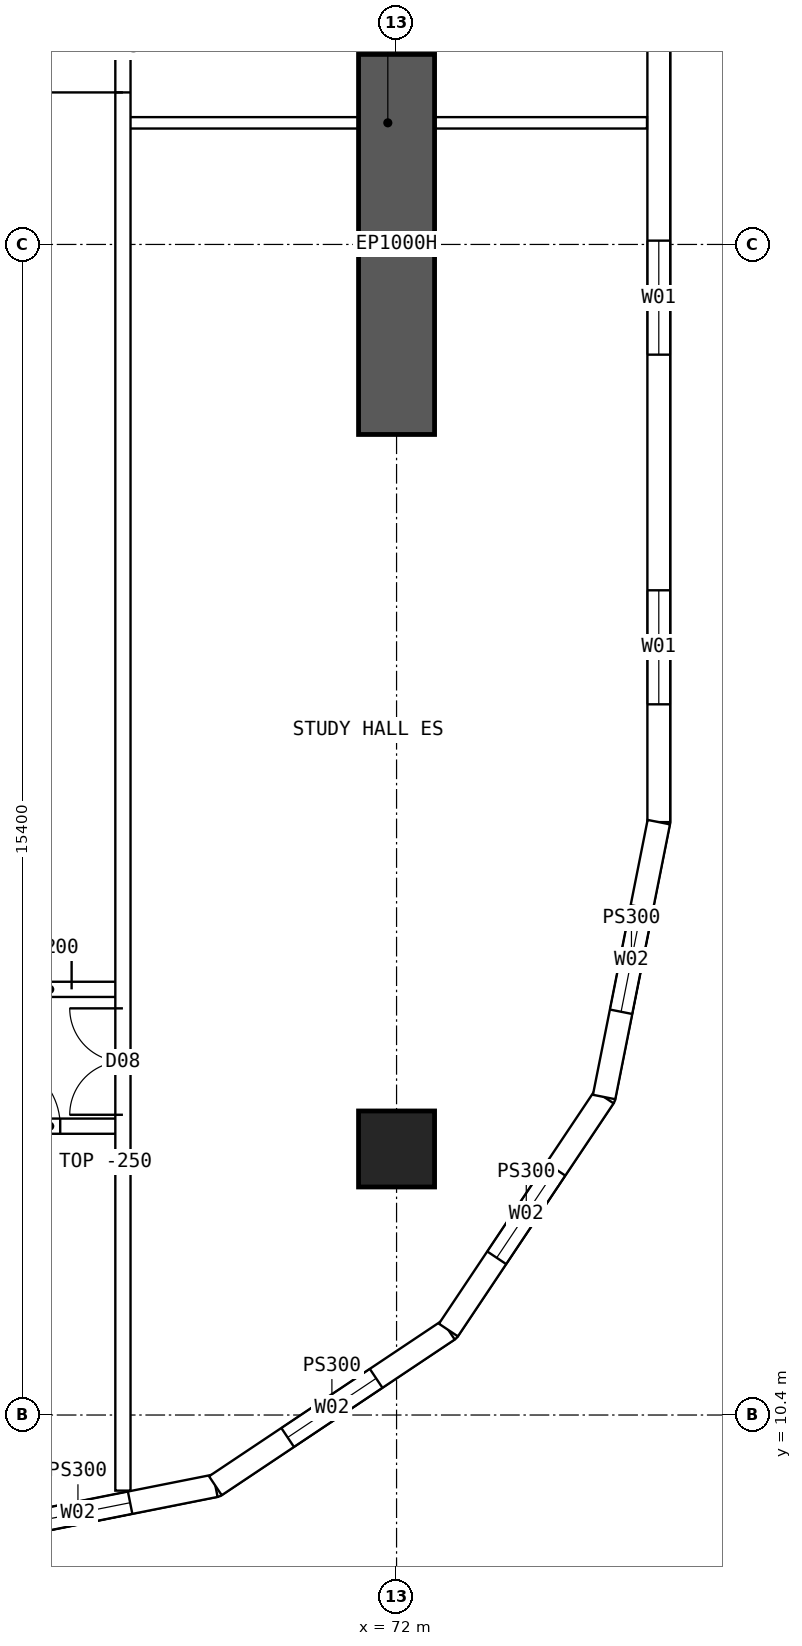
"""IFC4 building model, lengths in metres.
Left out: names, types, materials, properties, quantities, classifications, styles, units other than length and angle.
Written with IfcOpenShell. Run it as: python <this file> out.ifc"""

import sys

from ifc_helpers import new_model, si_unit, direction, frame, frame_2d, origin, origin_2d, place, context, subcontext, project, spatial, polyline, rectangle, hollow_rectangle, outline, extrude, element, fill, save


model = new_model("IFC4")
c1 = context("Model", 3, precision=1e-05, world=origin(), true_north=direction((0.0, 1.0)))
c2 = subcontext(c1, "Body", "Model", "MODEL_VIEW")
j1 = project(units=[si_unit("LENGTHUNIT", "METRE"), si_unit("PLANEANGLEUNIT", "RADIAN")], contexts=[c1])
p1 = place(None, origin())
s1 = spatial("IfcSite", under=j1, at=p1, CompositionType="ELEMENT")
p2 = place(p1, origin())
s2 = spatial("IfcBuilding", under=s1, at=p2, CompositionType="ELEMENT")
p3 = place(p2, frame((0.0, 0.0, 99.4)))
s3 = spatial("IfcBuildingStorey", under=s2, at=p3, CompositionType="ELEMENT", Elevation=99.4)
p4 = place(p3, frame((72.0, 13.9, 0.0), z_axis=(0.0, 0.0, 1.0), x_axis=(1.0, 0.0, 0.0)))
e1 = element("IfcColumn", 1, at=p4, inside=s3, PredefinedType="COLUMN", context=c2, shape_type="SweptSolid", body=[
    extrude(hollow_rectangle(XDim=1.0, YDim=1.0, WallThickness=0.1, at=origin_2d()), origin(), (0.0, 0.0, 1.0), 3.75),
])
p5 = place(p3, frame((72.0, 23.3, 0.0), z_axis=(0.0, 0.0, 1.0), x_axis=(0.0, 1.0, 0.0)))
e2 = element("IfcWall", 2, at=p5, inside=s3, PredefinedType="SHEAR", context=c2, shape_type="SweptSolid", body=[
    extrude(rectangle(XDim=5.0, YDim=1.0, at=frame_2d((2.5, 0.0))), origin(), (0.0, 0.0, 1.0), 3.75),
])
p6 = place(p3, frame((75.45, 18.2, 0.0), z_axis=(0.0, 0.0, 1.0), x_axis=(0.0, 1.0, 0.0)))
e3 = element("IfcWall", 3, at=p6, inside=s3, PredefinedType="SOLIDWALL", context=c2, shape_type="SweptSolid", body=[
    extrude(outline(polyline([(-0.015, -0.15), (27.615, -0.15), (27.585, 0.15), (0.015, 0.15), (-0.015, -0.15)])), origin(), (0.0, 0.0, 1.0), 3.5),
])
p7 = place(p6, frame((1.55, 0.0, 0.9)))
e4 = element("IfcOpeningElement", 4, at=p7, cuts=e3, PredefinedType="OPENING", context=c2, shape_type="SweptSolid", body=[
    extrude(rectangle(XDim=1.5, YDim=2.0, at=frame_2d((0.75, 1.0))), frame((0.0, 0.16, 0.0), z_axis=(0.0, -1.0, 0.0), x_axis=(1.0, 0.0, 0.0)), (0.0, 0.0, 1.0), 0.32),
])
p8 = place(p6, frame((6.15, 0.0, 0.9)))
e5 = element("IfcOpeningElement", 5, at=p8, cuts=e3, PredefinedType="OPENING", context=c2, shape_type="SweptSolid", body=[
    extrude(rectangle(XDim=1.5, YDim=2.0, at=frame_2d((0.75, 1.0))), frame((0.0, 0.16, 0.0), z_axis=(0.0, -1.0, 0.0), x_axis=(1.0, 0.0, 0.0)), (0.0, 0.0, 1.0), 0.32),
])
p9 = place(p6, frame((10.75, 0.0, 0.9)))
e6 = element("IfcOpeningElement", 6, at=p9, cuts=e3, PredefinedType="OPENING", context=c2, shape_type="SweptSolid", body=[
    extrude(rectangle(XDim=1.5, YDim=2.0, at=frame_2d((0.75, 1.0))), frame((0.0, 0.16, 0.0), z_axis=(0.0, -1.0, 0.0), x_axis=(1.0, 0.0, 0.0)), (0.0, 0.0, 1.0), 0.32),
])
p10 = place(p6, frame((15.35, 0.0, 0.9)))
e7 = element("IfcOpeningElement", 7, at=p10, cuts=e3, PredefinedType="OPENING", context=c2, shape_type="SweptSolid", body=[
    extrude(rectangle(XDim=1.5, YDim=2.0, at=frame_2d((0.75, 1.0))), frame((0.0, 0.16, 0.0), z_axis=(0.0, -1.0, 0.0), x_axis=(1.0, 0.0, 0.0)), (0.0, 0.0, 1.0), 0.32),
])
p11 = place(p6, frame((19.95, 0.0, 0.9)))
e8 = element("IfcOpeningElement", 8, at=p11, cuts=e3, PredefinedType="OPENING", context=c2, shape_type="SweptSolid", body=[
    extrude(rectangle(XDim=1.5, YDim=2.0, at=frame_2d((0.75, 1.0))), frame((0.0, 0.16, 0.0), z_axis=(0.0, -1.0, 0.0), x_axis=(1.0, 0.0, 0.0)), (0.0, 0.0, 1.0), 0.32),
])
p12 = place(p6, frame((24.55, 0.0, 0.9)))
e9 = element("IfcOpeningElement", 9, at=p12, cuts=e3, PredefinedType="OPENING", context=c2, shape_type="SweptSolid", body=[
    extrude(rectangle(XDim=1.5, YDim=2.0, at=frame_2d((0.75, 1.0))), frame((0.0, 0.16, 0.0), z_axis=(0.0, -1.0, 0.0), x_axis=(1.0, 0.0, 0.0)), (0.0, 0.0, 1.0), 0.32),
])
p13 = place(p3, frame((66.0, 8.75, 0.0), z_axis=(0.0, 0.0, 1.0), x_axis=(0.980791473772, 0.195059183267, 0.0)))
e10 = element("IfcWall", 10, at=p13, inside=s3, PredefinedType="SOLIDWALL", context=c2, shape_type="SweptSolid", body=[
    extrude(outline(polyline([(-0.03, -0.15), (3.717, -0.15), (3.657, 0.15), (0.03, 0.15), (-0.03, -0.15)])), origin(), (0.0, 0.0, 1.0), 3.5),
])
p14 = place(p13, frame((1.144, 0.0, 0.9)))
e11 = element("IfcOpeningElement", 11, at=p14, cuts=e10, PredefinedType="OPENING", context=c2, shape_type="SweptSolid", body=[
    extrude(rectangle(XDim=1.4, YDim=1.8, at=frame_2d((0.7, 0.9))), frame((0.0, 0.16, 0.0), z_axis=(0.0, -1.0, 0.0), x_axis=(1.0, 0.0, 0.0)), (0.0, 0.0, 1.0), 0.32),
])
p15 = place(p3, frame((69.616, 9.469, 0.0), z_axis=(0.0, 0.0, 1.0), x_axis=(0.831448786846, 0.555601399253, 0.0)))
e12 = element("IfcWall", 12, at=p15, inside=s3, PredefinedType="SOLIDWALL", context=c2, shape_type="SweptSolid", body=[
    extrude(outline(polyline([(-0.03, -0.15), (3.717, -0.15), (3.657, 0.15), (0.03, 0.15), (-0.03, -0.15)])), origin(), (0.0, 0.0, 1.0), 3.5),
])
p16 = place(p15, frame((1.144, 0.0, 0.9)))
e13 = element("IfcOpeningElement", 13, at=p16, cuts=e12, PredefinedType="OPENING", context=c2, shape_type="SweptSolid", body=[
    extrude(rectangle(XDim=1.4, YDim=1.8, at=frame_2d((0.7, 0.9))), frame((0.0, 0.16, 0.0), z_axis=(0.0, -1.0, 0.0), x_axis=(1.0, 0.0, 0.0)), (0.0, 0.0, 1.0), 0.32),
])
p17 = place(p3, frame((72.682, 11.518, 0.0), z_axis=(0.0, 0.0, 1.0), x_axis=(0.555601399253, 0.831448786846, 0.0)))
e14 = element("IfcWall", 14, at=p17, inside=s3, PredefinedType="SOLIDWALL", context=c2, shape_type="SweptSolid", body=[
    extrude(outline(polyline([(-0.03, -0.15), (3.717, -0.15), (3.657, 0.15), (0.03, 0.15), (-0.03, -0.15)])), origin(), (0.0, 0.0, 1.0), 3.5),
])
p18 = place(p17, frame((1.144, 0.0, 0.9)))
e15 = element("IfcOpeningElement", 15, at=p18, cuts=e14, PredefinedType="OPENING", context=c2, shape_type="SweptSolid", body=[
    extrude(rectangle(XDim=1.4, YDim=1.8, at=frame_2d((0.7, 0.9))), frame((0.0, 0.16, 0.0), z_axis=(0.0, -1.0, 0.0), x_axis=(1.0, 0.0, 0.0)), (0.0, 0.0, 1.0), 0.32),
])
p19 = place(p3, frame((74.731, 14.583, 0.0), z_axis=(0.0, 0.0, 1.0), x_axis=(0.195059183267, 0.980791473772, 0.0)))
e16 = element("IfcWall", 16, at=p19, inside=s3, PredefinedType="SOLIDWALL", context=c2, shape_type="SweptSolid", body=[
    extrude(outline(polyline([(-0.03, -0.15), (3.702, -0.15), (3.672, 0.15), (0.03, 0.15), (-0.03, -0.15)])), origin(), (0.0, 0.0, 1.0), 3.5),
])
p20 = place(p19, frame((1.144, 0.0, 0.9)))
e17 = element("IfcOpeningElement", 17, at=p20, cuts=e16, PredefinedType="OPENING", context=c2, shape_type="SweptSolid", body=[
    extrude(rectangle(XDim=1.4, YDim=1.8, at=frame_2d((0.7, 0.9))), frame((0.0, 0.16, 0.0), z_axis=(0.0, -1.0, 0.0), x_axis=(1.0, 0.0, 0.0)), (0.0, 0.0, 1.0), 0.32),
])
p21 = place(p3, frame((66.475, 14.2, 0.0), z_axis=(0.0, 0.0, 1.0), x_axis=(1.0, 0.0, 0.0)))
e18 = element("IfcWall", 18, at=p21, inside=s3, PredefinedType="SOLIDWALL", context=c2, shape_type="SweptSolid", body=[
    extrude(rectangle(XDim=1.925, YDim=0.2, at=frame_2d((0.962, 0.0))), origin(), (0.0, 0.0, 1.0), 3.5),
])
p22 = place(p21, frame((0.2, 0.0, 0.0)))
e19 = element("IfcOpeningElement", 19, at=p22, cuts=e18, PredefinedType="OPENING", context=c2, shape_type="SweptSolid", body=[
    extrude(rectangle(XDim=0.9, YDim=2.1, at=frame_2d((0.45, 1.05))), frame((0.0, 0.11, 0.0), z_axis=(0.0, -1.0, 0.0), x_axis=(1.0, 0.0, 0.0)), (0.0, 0.0, 1.0), 0.22),
])
p23 = place(p3, frame((66.475, 16.0, 0.0), z_axis=(0.0, 0.0, 1.0), x_axis=(1.0, 0.0, 0.0)))
e20 = element("IfcWall", 20, at=p23, inside=s3, PredefinedType="SOLIDWALL", context=c2, shape_type="SweptSolid", body=[
    extrude(rectangle(XDim=1.925, YDim=0.2, at=frame_2d((0.962, 0.0))), origin(), (0.0, 0.0, 1.0), 3.5),
])
p24 = place(p23, frame((0.05, 0.0, 0.0)))
e21 = element("IfcOpeningElement", 21, at=p24, cuts=e20, PredefinedType="OPENING", context=c2, shape_type="SweptSolid", body=[
    extrude(rectangle(XDim=1.2, YDim=2.1, at=frame_2d((0.6, 1.05))), frame((0.0, 0.11, 0.0), z_axis=(0.0, -1.0, 0.0), x_axis=(1.0, 0.0, 0.0)), (0.0, 0.0, 1.0), 0.22),
])
p25 = place(p3, frame((68.4, 9.405, 0.0), z_axis=(0.0, 0.0, 1.0), x_axis=(0.0, 1.0, 0.0)))
e22 = element("IfcWall", 22, at=p25, inside=s3, PredefinedType="SOLIDWALL", context=c2, shape_type="SweptSolid", body=[
    extrude(rectangle(XDim=45.189, YDim=0.2, at=frame_2d((22.595, 0.0))), origin(), (0.0, 0.0, 1.0), 3.5),
])
p26 = place(p25, frame((18.395, 0.0, 0.0)))
e23 = element("IfcOpeningElement", 23, at=p26, cuts=e22, PredefinedType="OPENING", context=c2, shape_type="SweptSolid", body=[
    extrude(rectangle(XDim=1.2, YDim=2.1, at=frame_2d((0.6, 1.05))), frame((0.0, 0.11, 0.0), z_axis=(0.0, -1.0, 0.0), x_axis=(1.0, 0.0, 0.0)), (0.0, 0.0, 1.0), 0.22),
])
p27 = place(p25, frame((30.195, 0.0, 0.0)))
e24 = element("IfcOpeningElement", 24, at=p27, cuts=e22, PredefinedType="OPENING", context=c2, shape_type="SweptSolid", body=[
    extrude(rectangle(XDim=1.2, YDim=2.1, at=frame_2d((0.6, 1.05))), frame((0.0, 0.11, 0.0), z_axis=(0.0, -1.0, 0.0), x_axis=(1.0, 0.0, 0.0)), (0.0, 0.0, 1.0), 0.22),
])
p28 = place(p25, frame((4.945, 0.0, 0.0)))
e25 = element("IfcOpeningElement", 25, at=p28, cuts=e22, PredefinedType="OPENING", context=c2, shape_type="SweptSolid", body=[
    extrude(rectangle(XDim=1.4, YDim=2.1, at=frame_2d((0.7, 1.05))), frame((0.0, 0.11, 0.0), z_axis=(0.0, -1.0, 0.0), x_axis=(1.0, 0.0, 0.0)), (0.0, 0.0, 1.0), 0.22),
])
p29 = place(p25, frame((38.745, 0.0, 0.0)))
e26 = element("IfcOpeningElement", 26, at=p29, cuts=e22, PredefinedType="OPENING", context=c2, shape_type="SweptSolid", body=[
    extrude(rectangle(XDim=1.4, YDim=2.1, at=frame_2d((0.7, 1.05))), frame((0.0, 0.11, 0.0), z_axis=(0.0, -1.0, 0.0), x_axis=(1.0, 0.0, 0.0)), (0.0, 0.0, 1.0), 0.22),
])
p30 = place(p3, frame((68.475, 27.4, 0.0), z_axis=(0.0, 0.0, 1.0), x_axis=(1.0, 0.0, 0.0)))
e27 = element("IfcWall", 27, at=p30, inside=s3, PredefinedType="PARTITIONING", context=c2, shape_type="SweptSolid", body=[
    extrude(rectangle(XDim=6.82, YDim=0.15, at=frame_2d((3.41, 0.0))), origin(), (0.0, 0.0, 1.0), 3.5),
])
p31 = place(p7, origin())
e28 = element("IfcWindow", 28, at=p31, inside=s3, PartitioningType="SINGLE_PANEL", PredefinedType="WINDOW", context=c2, shape_type="SweptSolid", body=[
    extrude(rectangle(XDim=1.5, YDim=2.0, at=frame_2d((0.75, 1.0))), frame((0.0, 0.03, 0.0), z_axis=(0.0, -1.0, 0.0), x_axis=(1.0, 0.0, 0.0)), (0.0, 0.0, 1.0), 0.06),
])
fill(e4, e28)
p32 = place(p8, origin())
e29 = element("IfcWindow", 29, at=p32, inside=s3, PartitioningType="SINGLE_PANEL", PredefinedType="WINDOW", context=c2, shape_type="SweptSolid", body=[
    extrude(rectangle(XDim=1.5, YDim=2.0, at=frame_2d((0.75, 1.0))), frame((0.0, 0.03, 0.0), z_axis=(0.0, -1.0, 0.0), x_axis=(1.0, 0.0, 0.0)), (0.0, 0.0, 1.0), 0.06),
])
fill(e5, e29)
p33 = place(p14, origin())
e30 = element("IfcWindow", 30, at=p33, inside=s3, PartitioningType="SINGLE_PANEL", PredefinedType="WINDOW", context=c2, shape_type="SweptSolid", body=[
    extrude(rectangle(XDim=1.4, YDim=1.8, at=frame_2d((0.7, 0.9))), frame((0.0, 0.03, 0.0), z_axis=(0.0, -1.0, 0.0), x_axis=(1.0, 0.0, 0.0)), (0.0, 0.0, 1.0), 0.06),
])
fill(e11, e30)
p34 = place(p16, origin())
e31 = element("IfcWindow", 31, at=p34, inside=s3, PartitioningType="SINGLE_PANEL", PredefinedType="WINDOW", context=c2, shape_type="SweptSolid", body=[
    extrude(rectangle(XDim=1.4, YDim=1.8, at=frame_2d((0.7, 0.9))), frame((0.0, 0.03, 0.0), z_axis=(0.0, -1.0, 0.0), x_axis=(1.0, 0.0, 0.0)), (0.0, 0.0, 1.0), 0.06),
])
fill(e13, e31)
p35 = place(p18, origin())
e32 = element("IfcWindow", 32, at=p35, inside=s3, PartitioningType="SINGLE_PANEL", PredefinedType="WINDOW", context=c2, shape_type="SweptSolid", body=[
    extrude(rectangle(XDim=1.4, YDim=1.8, at=frame_2d((0.7, 0.9))), frame((0.0, 0.03, 0.0), z_axis=(0.0, -1.0, 0.0), x_axis=(1.0, 0.0, 0.0)), (0.0, 0.0, 1.0), 0.06),
])
fill(e15, e32)
p36 = place(p20, origin())
e33 = element("IfcWindow", 33, at=p36, inside=s3, PartitioningType="SINGLE_PANEL", PredefinedType="WINDOW", context=c2, shape_type="SweptSolid", body=[
    extrude(rectangle(XDim=1.4, YDim=1.8, at=frame_2d((0.7, 0.9))), frame((0.0, 0.03, 0.0), z_axis=(0.0, -1.0, 0.0), x_axis=(1.0, 0.0, 0.0)), (0.0, 0.0, 1.0), 0.06),
])
fill(e17, e33)
p37 = place(p24, origin())
e34 = element("IfcDoor", 34, at=p37, inside=s3, OperationType="DOUBLE_DOOR_SINGLE_SWING", PredefinedType="DOOR", context=c2, shape_type="SweptSolid", body=[
    extrude(rectangle(XDim=1.2, YDim=2.1, at=frame_2d((0.6, 1.05))), frame((0.0, 0.025, 0.0), z_axis=(0.0, -1.0, 0.0), x_axis=(1.0, 0.0, 0.0)), (0.0, 0.0, 1.0), 0.05),
])
fill(e21, e34)
p38 = place(p26, origin())
e35 = element("IfcDoor", 35, at=p38, inside=s3, OperationType="SINGLE_SWING_LEFT", PredefinedType="DOOR", context=c2, shape_type="SweptSolid", body=[
    extrude(rectangle(XDim=1.2, YDim=2.1, at=frame_2d((0.6, 1.05))), frame((0.0, 0.025, 0.0), z_axis=(0.0, -1.0, 0.0), x_axis=(1.0, 0.0, 0.0)), (0.0, 0.0, 1.0), 0.05),
])
fill(e23, e35)
p39 = place(p28, origin())
e36 = element("IfcDoor", 36, at=p39, inside=s3, OperationType="DOUBLE_DOOR_SINGLE_SWING", PredefinedType="DOOR", context=c2, shape_type="SweptSolid", body=[
    extrude(rectangle(XDim=1.4, YDim=2.1, at=frame_2d((0.7, 1.05))), frame((0.0, 0.025, 0.0), z_axis=(0.0, -1.0, 0.0), x_axis=(1.0, 0.0, 0.0)), (0.0, 0.0, 1.0), 0.05),
])
fill(e25, e36)
p40 = place(p22, origin())
e37 = element("IfcDoor", 37, at=p40, inside=s3, OperationType="SINGLE_SWING_LEFT", PredefinedType="DOOR", context=c2, shape_type="SweptSolid", body=[
    extrude(rectangle(XDim=0.9, YDim=2.1, at=frame_2d((0.45, 1.05))), frame((0.0, 0.025, 0.0), z_axis=(0.0, -1.0, 0.0), x_axis=(1.0, 0.0, 0.0)), (0.0, 0.0, 1.0), 0.05),
])
fill(e19, e37)
save(model, sys.argv[1])
